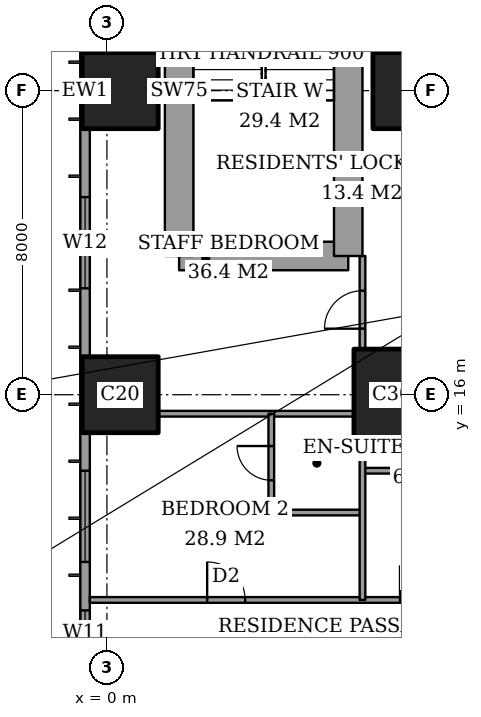
"""IFC4 building model, lengths in metres.
Left out: names, types, materials, properties, quantities, classifications, styles, units other than length and angle.
Written with IfcOpenShell. Run it as: python <this file> out.ifc"""

import sys

from ifc_helpers import new_model, si_unit, direction, frame, frame_2d, origin, origin_2d, place, context, subcontext, project, spatial, rectangle, extrude, element, fill, save


model = new_model("IFC4")
c1 = context("Model", 3, precision=1e-05, world=origin(), true_north=direction((0.0, 1.0)))
c2 = subcontext(c1, "Body", "Model", "MODEL_VIEW")
j1 = project(units=[si_unit("LENGTHUNIT", "METRE"), si_unit("PLANEANGLEUNIT", "RADIAN")], contexts=[c1])
p1 = place(None, origin())
s1 = spatial("IfcSite", under=j1, at=p1, CompositionType="ELEMENT")
p2 = place(p1, origin())
s2 = spatial("IfcBuilding", under=s1, at=p2, CompositionType="ELEMENT")
p3 = place(p2, frame((0.0, 0.0, 161.0)))
s3 = spatial("IfcBuildingStorey", under=s2, at=p3, CompositionType="ELEMENT", Elevation=161.0)
for number, where, z_axis, x_axis in (
    (1, (0.35, 16.0, 0.0), (0.0, 0.0, 1.0), (1.0, 0.0, 0.0)),
    (2, (0.35, 24.0, 0.0), (0.0, 0.0, 1.0), (1.0, 0.0, 0.0)),
):
    element("IfcColumn", number, at=place(p3, frame(where, z_axis=z_axis, x_axis=x_axis)), inside=s3, PredefinedType="COLUMN", context=c2, shape_type="SweptSolid", body=[
        extrude(rectangle(XDim=2.0, YDim=2.0, at=origin_2d()), origin(), (0.0, 0.0, 1.0), 3.6),
    ])
p4 = place(p3, frame((8.0, 16.0, 0.0), z_axis=(0.0, 0.0, 1.0), x_axis=(1.0, 0.0, 0.0)))
e3 = element("IfcColumn", 3, at=p4, inside=s3, PredefinedType="COLUMN", context=c2, shape_type="SweptSolid", body=[
    extrude(rectangle(XDim=3.0, YDim=2.4, at=origin_2d()), origin(), (0.0, 0.0, 1.0), 3.6),
])
p5 = place(p3, frame((8.0, 24.0, 0.0), z_axis=(0.0, 0.0, 1.0), x_axis=(1.0, 0.0, 0.0)))
e4 = element("IfcColumn", 4, at=p5, inside=s3, PredefinedType="COLUMN", context=c2, shape_type="SweptSolid", body=[
    extrude(rectangle(XDim=2.0, YDim=2.0, at=origin_2d()), origin(), (0.0, 0.0, 1.0), 3.6),
])
p6 = place(p3, frame((1.9, 19.65, 0.0), z_axis=(0.0, 0.0, 1.0), x_axis=(1.0, 0.0, 0.0)))
e5 = element("IfcWall", 5, at=p6, inside=s3, PredefinedType="SHEAR", context=c2, shape_type="SweptSolid", body=[
    extrude(rectangle(XDim=4.45, YDim=0.75, at=frame_2d((2.225, 0.0))), origin(), (0.0, 0.0, 1.0), 3.6),
])
p7 = place(p3, frame((6.35, 19.65, 0.0), z_axis=(0.0, 0.0, 1.0), x_axis=(0.0, 1.0, 0.0)))
e6 = element("IfcWall", 6, at=p7, inside=s3, PredefinedType="SHEAR", context=c2, shape_type="SweptSolid", body=[
    extrude(rectangle(XDim=8.7, YDim=0.75, at=frame_2d((4.35, 0.0))), origin(), (0.0, 0.0, 1.0), 3.6),
])
p8 = place(p7, frame((6.725, 0.0, 0.0)))
e7 = element("IfcOpeningElement", 7, at=p8, cuts=e6, PredefinedType="OPENING", context=c2, shape_type="SweptSolid", body=[
    extrude(rectangle(XDim=1.0, YDim=2.1, at=frame_2d((0.5, 1.05))), frame((0.0, 0.385, 0.0), z_axis=(0.0, -1.0, 0.0), x_axis=(1.0, 0.0, 0.0)), (0.0, 0.0, 1.0), 0.77),
])
p9 = place(p3, frame((1.9, 28.35, 0.0), z_axis=(0.0, 0.0, 1.0), x_axis=(0.0, -1.0, 0.0)))
e8 = element("IfcWall", 8, at=p9, inside=s3, PredefinedType="SHEAR", context=c2, shape_type="SweptSolid", body=[
    extrude(rectangle(XDim=8.7, YDim=0.75, at=frame_2d((4.35, 0.0))), origin(), (0.0, 0.0, 1.0), 3.6),
])
p10 = place(p3, frame((-0.575, 44.825, 0.0), z_axis=(0.0, 0.0, 1.0), x_axis=(0.0, -1.0, 0.0)))
e9 = element("IfcWall", 9, at=p10, inside=s3, PredefinedType="SOLIDWALL", context=c2, shape_type="SweptSolid", body=[
    extrude(rectangle(XDim=41.65, YDim=0.25, at=frame_2d((20.825, 0.0))), origin(), (0.0, 0.0, 1.0), 3.6),
])
p11 = place(p10, frame((0.775, 0.0, 0.4)))
e10 = element("IfcOpeningElement", 10, at=p11, cuts=e9, PredefinedType="OPENING", context=c2, shape_type="SweptSolid", body=[
    extrude(rectangle(XDim=2.4, YDim=2.2, at=frame_2d((1.2, 1.1))), frame((0.0, 0.135, 0.0), z_axis=(0.0, -1.0, 0.0), x_axis=(1.0, 0.0, 0.0)), (0.0, 0.0, 1.0), 0.27),
])
p12 = place(p10, frame((6.1, 0.0, 0.4)))
e11 = element("IfcOpeningElement", 11, at=p12, cuts=e9, PredefinedType="OPENING", context=c2, shape_type="SweptSolid", body=[
    extrude(rectangle(XDim=1.2, YDim=2.2, at=frame_2d((0.6, 1.1))), frame((0.0, 0.135, 0.0), z_axis=(0.0, -1.0, 0.0), x_axis=(1.0, 0.0, 0.0)), (0.0, 0.0, 1.0), 0.27),
])
p13 = place(p10, frame((8.425, 0.0, 0.4)))
e12 = element("IfcOpeningElement", 12, at=p13, cuts=e9, PredefinedType="OPENING", context=c2, shape_type="SweptSolid", body=[
    extrude(rectangle(XDim=2.4, YDim=2.2, at=frame_2d((1.2, 1.1))), frame((0.0, 0.135, 0.0), z_axis=(0.0, -1.0, 0.0), x_axis=(1.0, 0.0, 0.0)), (0.0, 0.0, 1.0), 0.27),
])
p14 = place(p10, frame((15.625, 0.0, 0.4)))
e13 = element("IfcOpeningElement", 13, at=p14, cuts=e9, PredefinedType="OPENING", context=c2, shape_type="SweptSolid", body=[
    extrude(rectangle(XDim=2.4, YDim=2.2, at=frame_2d((1.2, 1.1))), frame((0.0, 0.135, 0.0), z_axis=(0.0, -1.0, 0.0), x_axis=(1.0, 0.0, 0.0)), (0.0, 0.0, 1.0), 0.27),
])
p15 = place(p10, frame((23.625, 0.0, 0.4)))
e14 = element("IfcOpeningElement", 14, at=p15, cuts=e9, PredefinedType="OPENING", context=c2, shape_type="SweptSolid", body=[
    extrude(rectangle(XDim=2.4, YDim=2.2, at=frame_2d((1.2, 1.1))), frame((0.0, 0.135, 0.0), z_axis=(0.0, -1.0, 0.0), x_axis=(1.0, 0.0, 0.0)), (0.0, 0.0, 1.0), 0.27),
])
p16 = place(p10, frame((30.825, 0.0, 0.4)))
e15 = element("IfcOpeningElement", 15, at=p16, cuts=e9, PredefinedType="OPENING", context=c2, shape_type="SweptSolid", body=[
    extrude(rectangle(XDim=2.4, YDim=2.2, at=frame_2d((1.2, 1.1))), frame((0.0, 0.135, 0.0), z_axis=(0.0, -1.0, 0.0), x_axis=(1.0, 0.0, 0.0)), (0.0, 0.0, 1.0), 0.27),
])
p17 = place(p10, frame((34.5, 0.0, 0.4)))
e16 = element("IfcOpeningElement", 16, at=p17, cuts=e9, PredefinedType="OPENING", context=c2, shape_type="SweptSolid", body=[
    extrude(rectangle(XDim=1.2, YDim=2.2, at=frame_2d((0.6, 1.1))), frame((0.0, 0.135, 0.0), z_axis=(0.0, -1.0, 0.0), x_axis=(1.0, 0.0, 0.0)), (0.0, 0.0, 1.0), 0.27),
])
p18 = place(p10, frame((38.475, 0.0, 0.4)))
e17 = element("IfcOpeningElement", 17, at=p18, cuts=e9, PredefinedType="OPENING", context=c2, shape_type="SweptSolid", body=[
    extrude(rectangle(XDim=2.4, YDim=2.2, at=frame_2d((1.2, 1.1))), frame((0.0, 0.135, 0.0), z_axis=(0.0, -1.0, 0.0), x_axis=(1.0, 0.0, 0.0)), (0.0, 0.0, 1.0), 0.27),
])
p19 = place(p3, frame((-0.45, 10.6, 0.0), z_axis=(0.0, 0.0, 1.0), x_axis=(1.0, 0.0, 0.0)))
e18 = element("IfcWall", 18, at=p19, inside=s3, PredefinedType="PARTITIONING", context=c2, shape_type="SweptSolid", body=[
    extrude(rectangle(XDim=25.011, YDim=0.15, at=frame_2d((12.505, 0.0))), origin(), (0.0, 0.0, 1.0), 3.35),
])
p20 = place(p19, frame((10.65, 0.0, 0.0)))
e19 = element("IfcOpeningElement", 19, at=p20, cuts=e18, PredefinedType="OPENING", context=c2, shape_type="SweptSolid", body=[
    extrude(rectangle(XDim=1.0, YDim=2.1, at=frame_2d((0.5, 1.05))), frame((0.0, 0.085, 0.0), z_axis=(0.0, -1.0, 0.0), x_axis=(1.0, 0.0, 0.0)), (0.0, 0.0, 1.0), 0.17),
])
p21 = place(p19, frame((3.087, 0.0, 0.0)))
e20 = element("IfcOpeningElement", 20, at=p21, cuts=e18, PredefinedType="OPENING", context=c2, shape_type="SweptSolid", body=[
    extrude(rectangle(XDim=1.0, YDim=2.1, at=frame_2d((0.5, 1.05))), frame((0.0, 0.085, 0.0), z_axis=(0.0, -1.0, 0.0), x_axis=(1.0, 0.0, 0.0)), (0.0, 0.0, 1.0), 0.17),
])
p22 = place(p19, frame((8.163, 0.0, 0.0)))
e21 = element("IfcOpeningElement", 21, at=p22, cuts=e18, PredefinedType="OPENING", context=c2, shape_type="SweptSolid", body=[
    extrude(rectangle(XDim=0.9, YDim=2.1, at=frame_2d((0.45, 1.05))), frame((0.0, 0.085, 0.0), z_axis=(0.0, -1.0, 0.0), x_axis=(1.0, 0.0, 0.0)), (0.0, 0.0, 1.0), 0.17),
])
p23 = place(p19, frame((13.35, 0.0, 0.0)))
e22 = element("IfcOpeningElement", 22, at=p23, cuts=e18, PredefinedType="OPENING", context=c2, shape_type="SweptSolid", body=[
    extrude(rectangle(XDim=1.0, YDim=2.1, at=frame_2d((0.5, 1.05))), frame((0.0, 0.085, 0.0), z_axis=(0.0, -1.0, 0.0), x_axis=(1.0, 0.0, 0.0)), (0.0, 0.0, 1.0), 0.17),
])
p24 = place(p19, frame((16.45, 0.0, 0.0)))
e23 = element("IfcOpeningElement", 23, at=p24, cuts=e18, PredefinedType="OPENING", context=c2, shape_type="SweptSolid", body=[
    extrude(rectangle(XDim=1.0, YDim=2.1, at=frame_2d((0.5, 1.05))), frame((0.0, 0.085, 0.0), z_axis=(0.0, -1.0, 0.0), x_axis=(1.0, 0.0, 0.0)), (0.0, 0.0, 1.0), 0.17),
])
p25 = place(p19, frame((21.175, 0.0, 0.0)))
e24 = element("IfcOpeningElement", 24, at=p25, cuts=e18, PredefinedType="OPENING", context=c2, shape_type="SweptSolid", body=[
    extrude(rectangle(XDim=1.0, YDim=2.1, at=frame_2d((0.5, 1.05))), frame((0.0, 0.085, 0.0), z_axis=(0.0, -1.0, 0.0), x_axis=(1.0, 0.0, 0.0)), (0.0, 0.0, 1.0), 0.17),
])
p26 = place(p3, frame((4.325, 12.9, 0.0), z_axis=(0.0, 0.0, 1.0), x_axis=(1.0, 0.0, 0.0)))
e25 = element("IfcWall", 25, at=p26, inside=s3, PredefinedType="PARTITIONING", context=c2, shape_type="SweptSolid", body=[
    extrude(rectangle(XDim=2.4, YDim=0.15, at=frame_2d((1.2, 0.0))), origin(), (0.0, 0.0, 1.0), 3.35),
])
p27 = place(p3, frame((6.725, 14.0, 0.0), z_axis=(0.0, 0.0, 1.0), x_axis=(1.0, 0.0, 0.0)))
e26 = element("IfcWall", 26, at=p27, inside=s3, PredefinedType="PARTITIONING", context=c2, shape_type="SweptSolid", body=[
    extrude(rectangle(XDim=2.875, YDim=0.15, at=frame_2d((1.438, 0.0))), origin(), (0.0, 0.0, 1.0), 3.35),
])
p28 = place(p3, frame((1.35, 15.5, 0.0), z_axis=(0.0, 0.0, 1.0), x_axis=(1.0, 0.0, 0.0)))
e27 = element("IfcWall", 27, at=p28, inside=s3, PredefinedType="PARTITIONING", context=c2, shape_type="SweptSolid", body=[
    extrude(rectangle(XDim=5.15, YDim=0.15, at=frame_2d((2.575, 0.0))), origin(), (0.0, 0.0, 1.0), 3.35),
])
p29 = place(p3, frame((4.325, 12.9, 0.0), z_axis=(0.0, 0.0, 1.0), x_axis=(0.0, 1.0, 0.0)))
e28 = element("IfcWall", 28, at=p29, inside=s3, PredefinedType="PARTITIONING", context=c2, shape_type="SweptSolid", body=[
    extrude(rectangle(XDim=2.6, YDim=0.15, at=frame_2d((1.3, 0.0))), origin(), (0.0, 0.0, 1.0), 3.35),
])
p30 = place(p29, frame((0.85, 0.0, 0.0)))
e29 = element("IfcOpeningElement", 29, at=p30, cuts=e28, PredefinedType="OPENING", context=c2, shape_type="SweptSolid", body=[
    extrude(rectangle(XDim=0.9, YDim=2.1, at=frame_2d((0.45, 1.05))), frame((0.0, 0.085, 0.0), z_axis=(0.0, -1.0, 0.0), x_axis=(1.0, 0.0, 0.0)), (0.0, 0.0, 1.0), 0.17),
])
p31 = place(p3, frame((6.725, 10.6, 0.0), z_axis=(0.0, 0.0, 1.0), x_axis=(0.0, 1.0, 0.0)))
e30 = element("IfcWall", 30, at=p31, inside=s3, PredefinedType="PARTITIONING", context=c2, shape_type="SweptSolid", body=[
    extrude(rectangle(XDim=4.2, YDim=0.15, at=frame_2d((2.1, 0.0))), origin(), (0.0, 0.0, 1.0), 3.35),
])
p32 = place(p3, frame((6.725, 17.2, 0.0), z_axis=(0.0, 0.0, 1.0), x_axis=(0.0, 1.0, 0.0)))
e31 = element("IfcWall", 31, at=p32, inside=s3, PredefinedType="PARTITIONING", context=c2, shape_type="SweptSolid", body=[
    extrude(rectangle(XDim=2.45, YDim=0.15, at=frame_2d((1.225, 0.0))), origin(), (0.0, 0.0, 1.0), 3.35),
])
p33 = place(p32, frame((0.538, 0.0, 0.0)))
e32 = element("IfcOpeningElement", 32, at=p33, cuts=e31, PredefinedType="OPENING", context=c2, shape_type="SweptSolid", body=[
    extrude(rectangle(XDim=1.0, YDim=2.1, at=frame_2d((0.5, 1.05))), frame((0.0, 0.085, 0.0), z_axis=(0.0, -1.0, 0.0), x_axis=(1.0, 0.0, 0.0)), (0.0, 0.0, 1.0), 0.17),
])
p34 = place(p15, origin())
e33 = element("IfcWindow", 33, at=p34, inside=s3, PartitioningType="SINGLE_PANEL", PredefinedType="WINDOW", context=c2, shape_type="SweptSolid", body=[
    extrude(rectangle(XDim=2.4, YDim=2.2, at=frame_2d((1.2, 1.1))), frame((0.0, 0.03, 0.0), z_axis=(0.0, -1.0, 0.0), x_axis=(1.0, 0.0, 0.0)), (0.0, 0.0, 1.0), 0.06),
])
fill(e14, e33)
p35 = place(p16, origin())
e34 = element("IfcWindow", 34, at=p35, inside=s3, PartitioningType="SINGLE_PANEL", PredefinedType="WINDOW", context=c2, shape_type="SweptSolid", body=[
    extrude(rectangle(XDim=2.4, YDim=2.2, at=frame_2d((1.2, 1.1))), frame((0.0, 0.03, 0.0), z_axis=(0.0, -1.0, 0.0), x_axis=(1.0, 0.0, 0.0)), (0.0, 0.0, 1.0), 0.06),
])
fill(e15, e34)
p36 = place(p17, origin())
e35 = element("IfcWindow", 35, at=p36, inside=s3, PartitioningType="SINGLE_PANEL", PredefinedType="WINDOW", context=c2, shape_type="SweptSolid", body=[
    extrude(rectangle(XDim=1.2, YDim=2.2, at=frame_2d((0.6, 1.1))), frame((0.0, 0.03, 0.0), z_axis=(0.0, -1.0, 0.0), x_axis=(1.0, 0.0, 0.0)), (0.0, 0.0, 1.0), 0.06),
])
fill(e16, e35)
p37 = place(p30, origin())
e36 = element("IfcDoor", 36, at=p37, inside=s3, OperationType="SINGLE_SWING_LEFT", PredefinedType="DOOR", context=c2, shape_type="SweptSolid", body=[
    extrude(rectangle(XDim=0.9, YDim=2.1, at=frame_2d((0.45, 1.05))), frame((0.0, 0.025, 0.0), z_axis=(0.0, -1.0, 0.0), x_axis=(1.0, 0.0, 0.0)), (0.0, 0.0, 1.0), 0.05),
])
fill(e29, e36)
p38 = place(p21, origin())
e37 = element("IfcDoor", 37, at=p38, inside=s3, OperationType="SINGLE_SWING_RIGHT", PredefinedType="DOOR", context=c2, shape_type="SweptSolid", body=[
    extrude(rectangle(XDim=1.0, YDim=2.1, at=frame_2d((0.5, 1.05))), frame((0.0, 0.025, 0.0), z_axis=(0.0, -1.0, 0.0), x_axis=(1.0, 0.0, 0.0)), (0.0, 0.0, 1.0), 0.05),
])
fill(e20, e37)
p39 = place(p33, origin())
e38 = element("IfcDoor", 38, at=p39, inside=s3, OperationType="SINGLE_SWING_RIGHT", PredefinedType="DOOR", context=c2, shape_type="SweptSolid", body=[
    extrude(rectangle(XDim=1.0, YDim=2.1, at=frame_2d((0.5, 1.05))), frame((0.0, 0.025, 0.0), z_axis=(0.0, -1.0, 0.0), x_axis=(1.0, 0.0, 0.0)), (0.0, 0.0, 1.0), 0.05),
])
fill(e32, e38)
p40 = place(p22, origin())
e39 = element("IfcDoor", 39, at=p40, inside=s3, OperationType="SINGLE_SWING_RIGHT", PredefinedType="DOOR", context=c2, shape_type="SweptSolid", body=[
    extrude(rectangle(XDim=0.9, YDim=2.1, at=frame_2d((0.45, 1.05))), frame((0.0, 0.025, 0.0), z_axis=(0.0, -1.0, 0.0), x_axis=(1.0, 0.0, 0.0)), (0.0, 0.0, 1.0), 0.05),
])
fill(e21, e39)
save(model, sys.argv[1])
